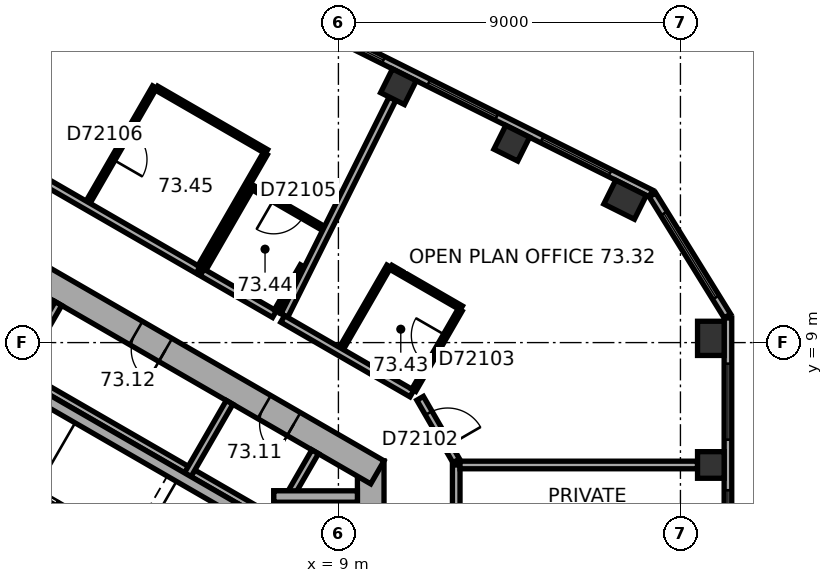
"""IFC4 building model, lengths in metres.
Left out: names, types, materials, properties, quantities, classifications, styles, units other than length and angle.
Written with IfcOpenShell. Run it as: python <this file> out.ifc"""

import sys

from ifc_helpers import new_model, si_unit, direction, frame, frame_2d, origin, origin_2d, place, context, subcontext, project, spatial, rectangle, extrude, element, fill, save


model = new_model("IFC4")
c1 = context("Model", 3, precision=1e-05, world=origin(), true_north=direction((0.0, 1.0)))
c2 = subcontext(c1, "Body", "Model", "MODEL_VIEW")
j1 = project(units=[si_unit("LENGTHUNIT", "METRE"), si_unit("PLANEANGLEUNIT", "RADIAN")], contexts=[c1])
p1 = place(None, origin())
s1 = spatial("IfcSite", under=j1, at=p1, CompositionType="ELEMENT")
p2 = place(p1, origin())
s2 = spatial("IfcBuilding", under=s1, at=p2, CompositionType="ELEMENT")
p3 = place(p2, frame((0.0, 0.0, 296.8)))
s3 = spatial("IfcBuildingStorey", under=s2, at=p3, CompositionType="ELEMENT", Elevation=296.8)
p4 = place(p3, frame((18.8, 5.78, 0.0), z_axis=(0.0, 0.0, 1.0), x_axis=(0.0, 1.0, 0.0)))
e1 = element("IfcColumn", 1, at=p4, inside=s3, PredefinedType="COLUMN", context=c2, shape_type="SweptSolid", body=[
    extrude(rectangle(XDim=0.7, YDim=0.7, at=origin_2d()), origin(), (0.0, 0.0, 1.0), 3.7),
])
for number, where, z_axis, x_axis in (
    (2, (18.8, 9.112, 0.0), (0.0, 0.0, 1.0), (0.0, 1.0, 0.0)),
    (3, (16.543, 12.759, 0.0), (0.0, 0.0, 1.0), (-0.895, 0.446, 0.0)),
):
    element("IfcColumn", number, at=place(p3, frame(where, z_axis=z_axis, x_axis=x_axis)), inside=s3, PredefinedType="COLUMN", context=c2, shape_type="SweptSolid", body=[
        extrude(rectangle(XDim=0.9, YDim=0.7, at=origin_2d()), origin(), (0.0, 0.0, 1.0), 3.7),
    ])
for number, where, z_axis, x_axis in (
    (4, (13.561, 14.246, 0.0), (0.0, 0.0, 1.0), (-0.895, 0.446, 0.0)),
    (5, (10.58, 15.732, 0.0), (0.0, 0.0, 1.0), (-0.895, 0.446, 0.0)),
):
    element("IfcColumn", number, at=place(p3, frame(where, z_axis=z_axis, x_axis=x_axis)), inside=s3, PredefinedType="COLUMN", context=c2, shape_type="SweptSolid", body=[
        extrude(rectangle(XDim=0.7, YDim=0.7, at=origin_2d()), origin(), (0.0, 0.0, 1.0), 3.7),
    ])
p5 = place(p3, frame((9.85, -5.889, 0.0), z_axis=(0.0, 0.0, 1.0), x_axis=(0.0, 1.0, 0.0)))
e6 = element("IfcWall", 6, at=p5, inside=s3, PredefinedType="SHEAR", context=c2, shape_type="SweptSolid", body=[
    extrude(rectangle(XDim=11.778, YDim=0.7, at=frame_2d((5.889, 0.0))), origin(), (0.0, 0.0, 1.0), 3.7),
])
p6 = place(p5, frame((6.089, 0.0, 0.0)))
e7 = element("IfcOpeningElement", 7, at=p6, cuts=e6, PredefinedType="OPENING", context=c2, shape_type="SweptSolid", body=[
    extrude(rectangle(XDim=1.5, YDim=2.1, at=frame_2d((0.75, 1.05))), frame((0.0, 0.36, 0.0), z_axis=(0.0, -1.0, 0.0), x_axis=(1.0, 0.0, 0.0)), (0.0, 0.0, 1.0), 0.72),
])
p7 = place(p5, frame((2.939, 0.0, 0.0)))
e8 = element("IfcOpeningElement", 8, at=p7, cuts=e6, PredefinedType="OPENING", context=c2, shape_type="SweptSolid", body=[
    extrude(rectangle(XDim=0.9, YDim=2.1, at=frame_2d((0.45, 1.05))), frame((0.0, 0.36, 0.0), z_axis=(0.0, -1.0, 0.0), x_axis=(1.0, 0.0, 0.0)), (0.0, 0.0, 1.0), 0.72),
])
p8 = place(p3, frame((10.025, 5.586, 0.0), z_axis=(0.0, 0.0, 1.0), x_axis=(-0.866026453023, 0.499998182661, 0.0)))
e9 = element("IfcWall", 9, at=p8, inside=s3, PredefinedType="SHEAR", context=c2, shape_type="SweptSolid", body=[
    extrude(rectangle(XDim=11.778, YDim=0.7, at=frame_2d((5.889, 0.0))), origin(), (0.0, 0.0, 1.0), 3.7),
])
p9 = place(p8, frame((2.539, 0.0, 0.0)))
e10 = element("IfcOpeningElement", 10, at=p9, cuts=e9, PredefinedType="OPENING", context=c2, shape_type="SweptSolid", body=[
    extrude(rectangle(XDim=0.9, YDim=2.1, at=frame_2d((0.45, 1.05))), frame((0.0, 0.36, 0.0), z_axis=(0.0, -1.0, 0.0), x_axis=(1.0, 0.0, 0.0)), (0.0, 0.0, 1.0), 0.72),
])
p10 = place(p8, frame((6.439, 0.0, 0.0)))
e11 = element("IfcOpeningElement", 11, at=p10, cuts=e9, PredefinedType="OPENING", context=c2, shape_type="SweptSolid", body=[
    extrude(rectangle(XDim=0.9, YDim=2.1, at=frame_2d((0.45, 1.05))), frame((0.0, 0.36, 0.0), z_axis=(0.0, -1.0, 0.0), x_axis=(1.0, 0.0, 0.0)), (0.0, 0.0, 1.0), 0.72),
])
p11 = place(p3, frame((19.25, -8.084, 0.0), z_axis=(0.0, 0.0, 1.0), x_axis=(0.0, 1.0, 0.0)))
e12 = element("IfcWall", 12, at=p11, inside=s3, PredefinedType="STANDARD", context=c2, shape_type="SweptSolid", body=[
    extrude(rectangle(XDim=17.731, YDim=0.2, at=frame_2d((8.866, 0.0))), origin(), (0.0, 0.0, 1.0), 3.7),
])
p12 = place(p11, frame((1.203, 0.0, 0.9)))
e13 = element("IfcOpeningElement", 13, at=p12, cuts=e12, PredefinedType="OPENING", context=c2, shape_type="SweptSolid", body=[
    extrude(rectangle(XDim=2.0, YDim=2.0, at=frame_2d((1.0, 1.0))), frame((0.0, 0.11, 0.0), z_axis=(0.0, -1.0, 0.0), x_axis=(1.0, 0.0, 0.0)), (0.0, 0.0, 1.0), 0.22),
])
p13 = place(p11, frame((4.535, 0.0, 0.9)))
e14 = element("IfcOpeningElement", 14, at=p13, cuts=e12, PredefinedType="OPENING", context=c2, shape_type="SweptSolid", body=[
    extrude(rectangle(XDim=2.0, YDim=2.0, at=frame_2d((1.0, 1.0))), frame((0.0, 0.11, 0.0), z_axis=(0.0, -1.0, 0.0), x_axis=(1.0, 0.0, 0.0)), (0.0, 0.0, 1.0), 0.22),
])
p14 = place(p11, frame((7.866, 0.0, 0.9)))
e15 = element("IfcOpeningElement", 15, at=p14, cuts=e12, PredefinedType="OPENING", context=c2, shape_type="SweptSolid", body=[
    extrude(rectangle(XDim=2.0, YDim=2.0, at=frame_2d((1.0, 1.0))), frame((0.0, 0.11, 0.0), z_axis=(0.0, -1.0, 0.0), x_axis=(1.0, 0.0, 0.0)), (0.0, 0.0, 1.0), 0.22),
])
p15 = place(p11, frame((11.198, 0.0, 0.9)))
e16 = element("IfcOpeningElement", 16, at=p15, cuts=e12, PredefinedType="OPENING", context=c2, shape_type="SweptSolid", body=[
    extrude(rectangle(XDim=2.0, YDim=2.0, at=frame_2d((1.0, 1.0))), frame((0.0, 0.11, 0.0), z_axis=(0.0, -1.0, 0.0), x_axis=(1.0, 0.0, 0.0)), (0.0, 0.0, 1.0), 0.22),
])
p16 = place(p11, frame((14.53, 0.0, 0.9)))
e17 = element("IfcOpeningElement", 17, at=p16, cuts=e12, PredefinedType="OPENING", context=c2, shape_type="SweptSolid", body=[
    extrude(rectangle(XDim=2.0, YDim=2.0, at=frame_2d((1.0, 1.0))), frame((0.0, 0.11, 0.0), z_axis=(0.0, -1.0, 0.0), x_axis=(1.0, 0.0, 0.0)), (0.0, 0.0, 1.0), 0.22),
])
p17 = place(p3, frame((19.235, 9.7, 0.0), z_axis=(0.0, 0.0, 1.0), x_axis=(-0.526233475464, 0.850340125656, 0.0)))
e18 = element("IfcWall", 18, at=p17, inside=s3, PredefinedType="STANDARD", context=c2, shape_type="SweptSolid", body=[
    extrude(rectangle(XDim=3.747, YDim=0.2, at=frame_2d((1.874, 0.0))), origin(), (0.0, 0.0, 1.0), 3.7),
])
p18 = place(p17, frame((0.573, 0.0, 0.9)))
e19 = element("IfcOpeningElement", 19, at=p18, cuts=e18, PredefinedType="OPENING", context=c2, shape_type="SweptSolid", body=[
    extrude(rectangle(XDim=2.6, YDim=2.0, at=frame_2d((1.3, 1.0))), frame((0.0, 0.11, 0.0), z_axis=(0.0, -1.0, 0.0), x_axis=(1.0, 0.0, 0.0)), (0.0, 0.0, 1.0), 0.22),
])
p19 = place(p3, frame((17.223, 12.923, 0.0), z_axis=(0.0, 0.0, 1.0), x_axis=(-0.894930561148, 0.44620543556, 0.0)))
e20 = element("IfcWall", 20, at=p19, inside=s3, PredefinedType="STANDARD", context=c2, shape_type="SweptSolid", body=[
    extrude(rectangle(XDim=17.731, YDim=0.2, at=frame_2d((8.866, 0.0))), origin(), (0.0, 0.0, 1.0), 3.7),
])
p20 = place(p19, frame((1.202, 0.0, 0.9)))
e21 = element("IfcOpeningElement", 21, at=p20, cuts=e20, PredefinedType="OPENING", context=c2, shape_type="SweptSolid", body=[
    extrude(rectangle(XDim=2.0, YDim=2.0, at=frame_2d((1.0, 1.0))), frame((0.0, 0.11, 0.0), z_axis=(0.0, -1.0, 0.0), x_axis=(1.0, 0.0, 0.0)), (0.0, 0.0, 1.0), 0.22),
])
p21 = place(p19, frame((4.533, 0.0, 0.9)))
e22 = element("IfcOpeningElement", 22, at=p21, cuts=e20, PredefinedType="OPENING", context=c2, shape_type="SweptSolid", body=[
    extrude(rectangle(XDim=2.0, YDim=2.0, at=frame_2d((1.0, 1.0))), frame((0.0, 0.11, 0.0), z_axis=(0.0, -1.0, 0.0), x_axis=(1.0, 0.0, 0.0)), (0.0, 0.0, 1.0), 0.22),
])
p22 = place(p19, frame((7.865, 0.0, 0.9)))
e23 = element("IfcOpeningElement", 23, at=p22, cuts=e20, PredefinedType="OPENING", context=c2, shape_type="SweptSolid", body=[
    extrude(rectangle(XDim=2.0, YDim=2.0, at=frame_2d((1.0, 1.0))), frame((0.0, 0.11, 0.0), z_axis=(0.0, -1.0, 0.0), x_axis=(1.0, 0.0, 0.0)), (0.0, 0.0, 1.0), 0.22),
])
p23 = place(p19, frame((11.197, 0.0, 0.9)))
e24 = element("IfcOpeningElement", 24, at=p23, cuts=e20, PredefinedType="OPENING", context=c2, shape_type="SweptSolid", body=[
    extrude(rectangle(XDim=2.0, YDim=2.0, at=frame_2d((1.0, 1.0))), frame((0.0, 0.11, 0.0), z_axis=(0.0, -1.0, 0.0), x_axis=(1.0, 0.0, 0.0)), (0.0, 0.0, 1.0), 0.22),
])
p24 = place(p19, frame((14.528, 0.0, 0.9)))
e25 = element("IfcOpeningElement", 25, at=p24, cuts=e20, PredefinedType="OPENING", context=c2, shape_type="SweptSolid", body=[
    extrude(rectangle(XDim=2.0, YDim=2.0, at=frame_2d((1.0, 1.0))), frame((0.0, 0.11, 0.0), z_axis=(0.0, -1.0, 0.0), x_axis=(1.0, 0.0, 0.0)), (0.0, 0.0, 1.0), 0.22),
])
p25 = place(p3, frame((7.424, 4.259, 0.0), z_axis=(0.0, 0.0, 1.0), x_axis=(-0.866026010844, 0.49999894854, 0.0)))
e26 = element("IfcWall", 26, at=p25, inside=s3, PredefinedType="PARTITIONING", context=c2, shape_type="SweptSolid", body=[
    extrude(rectangle(XDim=8.0, YDim=0.2, at=frame_2d((4.0, 0.0))), origin(), (0.0, 0.0, 1.0), 3.35),
])
for number, where, z_axis, x_axis in (
    (27, (7.287, 4.222, 0.0), (0.0, 0.0, 1.0), (0.5, 0.866, 0.0)),
    (28, (5.036, 5.522, 0.0), (0.0, 0.0, 1.0), (0.5, 0.866, 0.0)),
    (29, (0.532, 8.122, 0.0), (0.0, 0.0, 1.0), (0.5, 0.866, 0.0)),
):
    element("IfcWall", number, at=place(p3, frame(where, z_axis=z_axis, x_axis=x_axis)), inside=s3, PredefinedType="PARTITIONING", context=c2, shape_type="SweptSolid", body=[
        extrude(rectangle(XDim=2.2, YDim=0.2, at=frame_2d((1.1, 0.0))), origin(), (0.0, 0.0, 1.0), 3.35),
    ])
p26 = place(p3, frame((6.303, 4.617, 0.0), z_axis=(0.0, 0.0, 1.0), x_axis=(-0.866027801685, 0.499995846692, 0.0)))
e30 = element("IfcWall", 30, at=p26, inside=s3, PredefinedType="SHEAR", context=c2, shape_type="SweptSolid", body=[
    extrude(rectangle(XDim=7.06, YDim=0.3, at=frame_2d((3.53, 0.0))), origin(), (0.0, 0.0, 1.0), 3.35),
])
p27 = place(p3, frame((7.45, 1.75, 0.0), z_axis=(0.0, 0.0, 1.0), x_axis=(0.0, 1.0, 0.0)))
e31 = element("IfcWall", 31, at=p27, inside=s3, PredefinedType="SHEAR", context=c2, shape_type="SweptSolid", body=[
    extrude(rectangle(XDim=3.35, YDim=0.3, at=frame_2d((1.675, 0.0))), origin(), (0.0, 0.0, 1.0), 3.35),
])
p28 = place(p3, frame((7.3, 4.95, 0.0), z_axis=(0.0, 0.0, 1.0), x_axis=(1.0, 0.0, 0.0)))
e32 = element("IfcWall", 32, at=p28, inside=s3, PredefinedType="SHEAR", context=c2, shape_type="SweptSolid", body=[
    extrude(rectangle(XDim=2.2, YDim=0.3, at=frame_2d((1.1, 0.0))), origin(), (0.0, 0.0, 1.0), 3.35),
])
p29 = place(p3, frame((2.413, 12.694, 0.0), z_axis=(0.0, 0.0, 1.0), x_axis=(0.500010275428, 0.866019471182, 0.0)))
e33 = element("IfcWall", 33, at=p29, inside=s3, PredefinedType="PARTITIONING", context=c2, shape_type="SweptSolid", body=[
    extrude(rectangle(XDim=3.5, YDim=0.12, at=frame_2d((1.75, 0.0))), origin(), (0.0, 0.0, 1.0), 3.35),
])
p30 = place(p29, frame((1.3, 0.0, 0.0)))
e34 = element("IfcOpeningElement", 34, at=p30, cuts=e33, PredefinedType="OPENING", context=c2, shape_type="SweptSolid", body=[
    extrude(rectangle(XDim=0.9, YDim=2.1, at=frame_2d((0.45, 1.05))), frame((0.0, 0.07, 0.0), z_axis=(0.0, -1.0, 0.0), x_axis=(1.0, 0.0, 0.0)), (0.0, 0.0, 1.0), 0.14),
])
p31 = place(p3, frame((4.215, 15.695, 0.0), z_axis=(0.0, 0.0, 1.0), x_axis=(0.865989591418, -0.50006202371, 0.0)))
e35 = element("IfcWall", 35, at=p31, inside=s3, PredefinedType="PARTITIONING", context=c2, shape_type="SweptSolid", body=[
    extrude(rectangle(XDim=3.34, YDim=0.12, at=frame_2d((1.67, 0.0))), origin(), (0.0, 0.0, 1.0), 3.35),
])
p32 = place(p3, frame((5.308, 10.907, 0.0), z_axis=(0.0, 0.0, 1.0), x_axis=(-0.866028394472, 0.499994819941, 0.0)))
e36 = element("IfcWall", 36, at=p32, inside=s3, PredefinedType="PARTITIONING", context=c2, shape_type="SweptSolid", body=[
    extrude(rectangle(XDim=4.992, YDim=0.2, at=frame_2d((2.496, 0.0))), origin(), (0.0, 0.0, 1.0), 3.35),
])
p33 = place(p3, frame((5.461, 10.934, 0.0), z_axis=(0.0, 0.0, 1.0), x_axis=(0.500004234368, 0.866022959057, 0.0)))
e37 = element("IfcWall", 37, at=p33, inside=s3, PredefinedType="PARTITIONING", context=c2, shape_type="SweptSolid", body=[
    extrude(rectangle(XDim=2.5, YDim=0.12, at=frame_2d((1.25, 0.0))), origin(), (0.0, 0.0, 1.0), 3.35),
])
p34 = place(p3, frame((6.763, 13.069, 0.0), z_axis=(0.0, 0.0, 1.0), x_axis=(0.866019511163, -0.500010206181, 0.0)))
e38 = element("IfcWall", 38, at=p34, inside=s3, PredefinedType="PARTITIONING", context=c2, shape_type="SweptSolid", body=[
    extrude(rectangle(XDim=2.13, YDim=0.12, at=frame_2d((1.065, 0.0))), origin(), (0.0, 0.0, 1.0), 3.35),
])
p35 = place(p34, frame((0.615, 0.0, 0.0)))
e39 = element("IfcOpeningElement", 39, at=p35, cuts=e38, PredefinedType="OPENING", context=c2, shape_type="SweptSolid", body=[
    extrude(rectangle(XDim=0.9, YDim=2.1, at=frame_2d((0.45, 1.05))), frame((0.0, 0.07, 0.0), z_axis=(0.0, -1.0, 0.0), x_axis=(1.0, 0.0, 0.0)), (0.0, 0.0, 1.0), 0.14),
])
p36 = place(p3, frame((7.077, 13.973, 0.0), z_axis=(0.0, 0.0, 1.0), x_axis=(-0.499955923987, -0.866050849587, 0.0)))
e40 = element("IfcWall", 40, at=p36, inside=s3, PredefinedType="PARTITIONING", context=c2, shape_type="SweptSolid", body=[
    extrude(rectangle(XDim=3.44, YDim=0.12, at=frame_2d((1.72, 0.0))), origin(), (0.0, 0.0, 1.0), 3.35),
])
p37 = place(p3, frame((7.317, 9.748, 0.0), z_axis=(0.0, 0.0, 1.0), x_axis=(-0.866028486751, 0.499994660107, 0.0)))
e41 = element("IfcWall", 41, at=p37, inside=s3, PredefinedType="PARTITIONING", context=c2, shape_type="SweptSolid", body=[
    extrude(rectangle(XDim=2.2, YDim=0.2, at=frame_2d((1.1, 0.0))), origin(), (0.0, 0.0, 1.0), 3.35),
])
p38 = place(p3, frame((8.051, 11.019, 0.0), z_axis=(0.0, 0.0, 1.0), x_axis=(-0.500093228334, -0.86597157169, 0.0)))
e42 = element("IfcWall", 42, at=p38, inside=s3, PredefinedType="PARTITIONING", context=c2, shape_type="SweptSolid", body=[
    extrude(rectangle(XDim=1.368, YDim=0.12, at=frame_2d((0.684, 0.0))), origin(), (0.0, 0.0, 1.0), 3.35),
])
p39 = place(p3, frame((9.078, 8.846, 0.0), z_axis=(0.0, 0.0, 1.0), x_axis=(0.500004234368, 0.866022959057, 0.0)))
e43 = element("IfcWall", 43, at=p39, inside=s3, PredefinedType="PARTITIONING", context=c2, shape_type="SweptSolid", body=[
    extrude(rectangle(XDim=2.5, YDim=0.12, at=frame_2d((1.25, 0.0))), origin(), (0.0, 0.0, 1.0), 3.35),
])
p40 = place(p3, frame((10.38, 10.981, 0.0), z_axis=(0.0, 0.0, 1.0), x_axis=(0.86600889856, -0.500028586798, 0.0)))
e44 = element("IfcWall", 44, at=p40, inside=s3, PredefinedType="PARTITIONING", context=c2, shape_type="SweptSolid", body=[
    extrude(rectangle(XDim=2.14, YDim=0.12, at=frame_2d((1.07, 0.0))), origin(), (0.0, 0.0, 1.0), 3.35),
])
p41 = place(p3, frame((10.423, 15.419, 0.0), z_axis=(0.0, 0.0, 1.0), x_axis=(-0.446202606517, -0.894931971681, 0.0)))
e45 = element("IfcWall", 45, at=p41, inside=s3, PredefinedType="PARTITIONING", context=c2, shape_type="SweptSolid", body=[
    extrude(rectangle(XDim=6.377, YDim=0.2, at=frame_2d((3.188, 0.0))), origin(), (0.0, 0.0, 1.0), 2.65),
])
p42 = place(p3, frame((10.934, 7.659, 0.0), z_axis=(0.0, 0.0, 1.0), x_axis=(-0.866034411203, 0.499984398369, 0.0)))
e46 = element("IfcWall", 46, at=p42, inside=s3, PredefinedType="PARTITIONING", context=c2, shape_type="SweptSolid", body=[
    extrude(rectangle(XDim=3.927, YDim=0.2, at=frame_2d((1.963, 0.0))), origin(), (0.0, 0.0, 1.0), 3.35),
])
p43 = place(p3, frame((12.1, 2.448, 0.0), z_axis=(0.0, 0.0, 1.0), x_axis=(0.0, 1.0, 0.0)))
e47 = element("IfcWall", 47, at=p43, inside=s3, PredefinedType="PARTITIONING", context=c2, shape_type="SweptSolid", body=[
    extrude(rectangle(XDim=3.332, YDim=0.2, at=frame_2d((1.666, 0.0))), origin(), (0.0, 0.0, 1.0), 3.35),
])
p44 = place(p3, frame((12.1, 5.889, 0.0), z_axis=(0.0, 0.0, 1.0), x_axis=(-0.500063520245, 0.865988727248, 0.0)))
e48 = element("IfcWall", 48, at=p44, inside=s3, PredefinedType="PARTITIONING", context=c2, shape_type="SweptSolid", body=[
    extrude(rectangle(XDim=1.9, YDim=0.2, at=frame_2d((0.95, 0.0))), origin(), (0.0, 0.0, 1.0), 3.35),
])
p45 = place(p44, frame((0.45, 0.0, 0.0)))
e49 = element("IfcOpeningElement", 49, at=p45, cuts=e48, PredefinedType="OPENING", context=c2, shape_type="SweptSolid", body=[
    extrude(rectangle(XDim=1.0, YDim=2.1, at=frame_2d((0.5, 1.05))), frame((0.0, 0.11, 0.0), z_axis=(0.0, -1.0, 0.0), x_axis=(1.0, 0.0, 0.0)), (0.0, 0.0, 1.0), 0.22),
])
p46 = place(p3, frame((12.204, 9.859, 0.0), z_axis=(0.0, 0.0, 1.0), x_axis=(-0.500077547548, -0.865980627057, 0.0)))
e50 = element("IfcWall", 50, at=p46, inside=s3, PredefinedType="PARTITIONING", context=c2, shape_type="SweptSolid", body=[
    extrude(rectangle(XDim=2.44, YDim=0.12, at=frame_2d((1.22, 0.0))), origin(), (0.0, 0.0, 1.0), 3.35),
])
p47 = place(p46, frame((0.77, 0.0, 0.0)))
e51 = element("IfcOpeningElement", 51, at=p47, cuts=e50, PredefinedType="OPENING", context=c2, shape_type="SweptSolid", body=[
    extrude(rectangle(XDim=0.9, YDim=2.1, at=frame_2d((0.45, 1.05))), frame((0.0, 0.07, 0.0), z_axis=(0.0, -1.0, 0.0), x_axis=(1.0, 0.0, 0.0)), (0.0, 0.0, 1.0), 0.14),
])
p48 = place(p3, frame((18.45, 5.78, 0.0), z_axis=(0.0, 0.0, 1.0), x_axis=(-1.0, 0.0, 0.0)))
e52 = element("IfcWall", 52, at=p48, inside=s3, PredefinedType="PARTITIONING", context=c2, shape_type="SweptSolid", body=[
    extrude(rectangle(XDim=6.25, YDim=0.2, at=frame_2d((3.125, 0.0))), origin(), (0.0, 0.0, 1.0), 3.35),
])
p49 = place(p15, origin())
e53 = element("IfcWindow", 53, at=p49, inside=s3, PartitioningType="SINGLE_PANEL", PredefinedType="WINDOW", context=c2, shape_type="SweptSolid", body=[
    extrude(rectangle(XDim=2.0, YDim=2.0, at=frame_2d((1.0, 1.0))), frame((0.0, 0.03, 0.0), z_axis=(0.0, -1.0, 0.0), x_axis=(1.0, 0.0, 0.0)), (0.0, 0.0, 1.0), 0.06),
])
fill(e16, e53)
p50 = place(p16, origin())
e54 = element("IfcWindow", 54, at=p50, inside=s3, PartitioningType="SINGLE_PANEL", PredefinedType="WINDOW", context=c2, shape_type="SweptSolid", body=[
    extrude(rectangle(XDim=2.0, YDim=2.0, at=frame_2d((1.0, 1.0))), frame((0.0, 0.03, 0.0), z_axis=(0.0, -1.0, 0.0), x_axis=(1.0, 0.0, 0.0)), (0.0, 0.0, 1.0), 0.06),
])
fill(e17, e54)
p51 = place(p18, origin())
e55 = element("IfcWindow", 55, at=p51, inside=s3, PartitioningType="SINGLE_PANEL", PredefinedType="WINDOW", context=c2, shape_type="SweptSolid", body=[
    extrude(rectangle(XDim=2.6, YDim=2.0, at=frame_2d((1.3, 1.0))), frame((0.0, 0.03, 0.0), z_axis=(0.0, -1.0, 0.0), x_axis=(1.0, 0.0, 0.0)), (0.0, 0.0, 1.0), 0.06),
])
fill(e19, e55)
p52 = place(p20, origin())
e56 = element("IfcWindow", 56, at=p52, inside=s3, PartitioningType="SINGLE_PANEL", PredefinedType="WINDOW", context=c2, shape_type="SweptSolid", body=[
    extrude(rectangle(XDim=2.0, YDim=2.0, at=frame_2d((1.0, 1.0))), frame((0.0, 0.03, 0.0), z_axis=(0.0, -1.0, 0.0), x_axis=(1.0, 0.0, 0.0)), (0.0, 0.0, 1.0), 0.06),
])
fill(e21, e56)
p53 = place(p21, origin())
e57 = element("IfcWindow", 57, at=p53, inside=s3, PartitioningType="SINGLE_PANEL", PredefinedType="WINDOW", context=c2, shape_type="SweptSolid", body=[
    extrude(rectangle(XDim=2.0, YDim=2.0, at=frame_2d((1.0, 1.0))), frame((0.0, 0.03, 0.0), z_axis=(0.0, -1.0, 0.0), x_axis=(1.0, 0.0, 0.0)), (0.0, 0.0, 1.0), 0.06),
])
fill(e22, e57)
p54 = place(p22, origin())
e58 = element("IfcWindow", 58, at=p54, inside=s3, PartitioningType="SINGLE_PANEL", PredefinedType="WINDOW", context=c2, shape_type="SweptSolid", body=[
    extrude(rectangle(XDim=2.0, YDim=2.0, at=frame_2d((1.0, 1.0))), frame((0.0, 0.03, 0.0), z_axis=(0.0, -1.0, 0.0), x_axis=(1.0, 0.0, 0.0)), (0.0, 0.0, 1.0), 0.06),
])
fill(e23, e58)
p55 = place(p9, origin())
e59 = element("IfcDoor", 59, at=p55, inside=s3, OperationType="SINGLE_SWING_LEFT", PredefinedType="DOOR", context=c2, shape_type="SweptSolid", body=[
    extrude(rectangle(XDim=0.9, YDim=2.1, at=frame_2d((0.45, 1.05))), frame((0.0, 0.025, 0.0), z_axis=(0.0, -1.0, 0.0), x_axis=(1.0, 0.0, 0.0)), (0.0, 0.0, 1.0), 0.05),
])
fill(e10, e59)
p56 = place(p10, origin())
e60 = element("IfcDoor", 60, at=p56, inside=s3, OperationType="SINGLE_SWING_LEFT", PredefinedType="DOOR", context=c2, shape_type="SweptSolid", body=[
    extrude(rectangle(XDim=0.9, YDim=2.1, at=frame_2d((0.45, 1.05))), frame((0.0, 0.025, 0.0), z_axis=(0.0, -1.0, 0.0), x_axis=(1.0, 0.0, 0.0)), (0.0, 0.0, 1.0), 0.05),
])
fill(e11, e60)
p57 = place(p45, origin())
e61 = element("IfcDoor", 61, at=p57, inside=s3, OperationType="SINGLE_SWING_LEFT", PredefinedType="DOOR", context=c2, shape_type="SweptSolid", body=[
    extrude(rectangle(XDim=1.0, YDim=2.1, at=frame_2d((0.5, 1.05))), frame((0.0, 0.025, 0.0), z_axis=(0.0, -1.0, 0.0), x_axis=(1.0, 0.0, 0.0)), (0.0, 0.0, 1.0), 0.05),
])
fill(e49, e61)
p58 = place(p47, origin())
e62 = element("IfcDoor", 62, at=p58, inside=s3, OperationType="SINGLE_SWING_LEFT", PredefinedType="DOOR", context=c2, shape_type="SweptSolid", body=[
    extrude(rectangle(XDim=0.9, YDim=2.1, at=frame_2d((0.45, 1.05))), frame((0.0, 0.025, 0.0), z_axis=(0.0, -1.0, 0.0), x_axis=(1.0, 0.0, 0.0)), (0.0, 0.0, 1.0), 0.05),
])
fill(e51, e62)
p59 = place(p35, origin())
e63 = element("IfcDoor", 63, at=p59, inside=s3, OperationType="SINGLE_SWING_LEFT", PredefinedType="DOOR", context=c2, shape_type="SweptSolid", body=[
    extrude(rectangle(XDim=0.9, YDim=2.1, at=frame_2d((0.45, 1.05))), frame((0.0, 0.025, 0.0), z_axis=(0.0, -1.0, 0.0), x_axis=(1.0, 0.0, 0.0)), (0.0, 0.0, 1.0), 0.05),
])
fill(e39, e63)
p60 = place(p30, origin())
e64 = element("IfcDoor", 64, at=p60, inside=s3, OperationType="SINGLE_SWING_LEFT", PredefinedType="DOOR", context=c2, shape_type="SweptSolid", body=[
    extrude(rectangle(XDim=0.9, YDim=2.1, at=frame_2d((0.45, 1.05))), frame((0.0, 0.025, 0.0), z_axis=(0.0, -1.0, 0.0), x_axis=(1.0, 0.0, 0.0)), (0.0, 0.0, 1.0), 0.05),
])
fill(e34, e64)
save(model, sys.argv[1])
